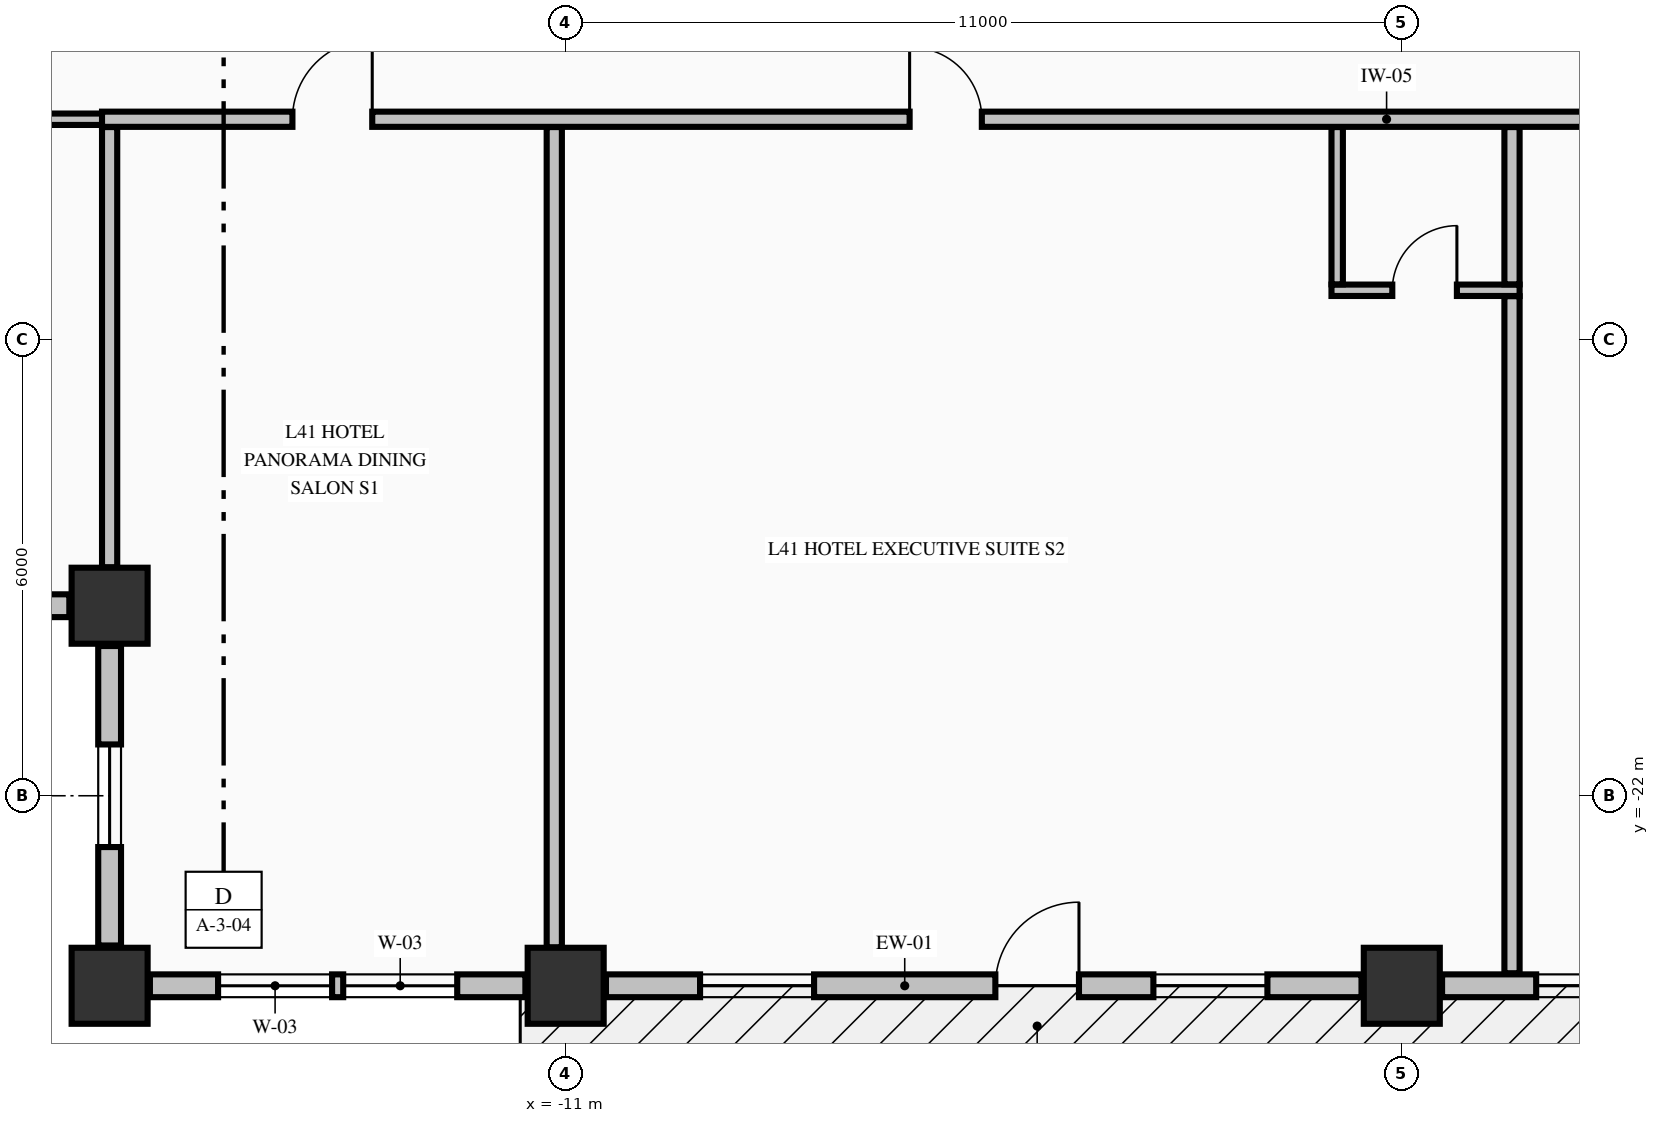
"""IFC4 building model, lengths in metres.
Left out: names, types, materials, properties, quantities, classifications, styles, units other than length and angle.
Written with IfcOpenShell. Run it as: python <this file> out.ifc"""

import sys

from ifc_helpers import new_model, si_unit, direction, frame, frame_2d, origin, origin_2d, place, context, subcontext, project, spatial, rectangle, extrude, element, fill, save


model = new_model("IFC4")
c1 = context("Model", 3, precision=1e-05, world=origin(), true_north=direction((0.0, 1.0)))
c2 = subcontext(c1, "Body", "Model", "MODEL_VIEW")
j1 = project(units=[si_unit("LENGTHUNIT", "METRE"), si_unit("PLANEANGLEUNIT", "RADIAN")], contexts=[c1])
p1 = place(None, origin())
s1 = spatial("IfcSite", under=j1, at=p1, CompositionType="ELEMENT")
p2 = place(p1, origin())
s2 = spatial("IfcBuilding", under=s1, at=p2, CompositionType="ELEMENT")
p3 = place(p2, frame((0.0, 0.0, 162.66)))
s3 = spatial("IfcBuildingStorey", under=s2, at=p3, CompositionType="ELEMENT", Elevation=162.66)
for number, where, z_axis, x_axis in (
    (1, (-17.0, -24.5, -0.25), (0.0, 0.0, 1.0), (1.0, 0.0, 0.0)),
    (2, (-11.0, -24.5, -0.25), (0.0, 0.0, 1.0), (1.0, 0.0, 0.0)),
    (3, (0.0, -24.5, -0.25), (0.0, 0.0, 1.0), (1.0, 0.0, 0.0)),
    (4, (-17.0, -19.5, -0.25), (0.0, 0.0, 1.0), (1.0, 0.0, 0.0)),
):
    element("IfcColumn", number, at=place(p3, frame(where, z_axis=z_axis, x_axis=x_axis)), inside=s3, PredefinedType="COLUMN", context=c2, shape_type="SweptSolid", body=[
        extrude(rectangle(XDim=1.0, YDim=1.0, at=origin_2d()), origin(), (0.0, 0.0, 1.0), 3.4),
    ])
p4 = place(p3, frame((-21.47, -19.5, 0.0), z_axis=(0.0, 0.0, 1.0), x_axis=(1.0, 0.0, 0.0)))
e5 = element("IfcWall", 5, at=p4, inside=s3, PredefinedType="STANDARD", context=c2, shape_type="SweptSolid", body=[
    extrude(rectangle(XDim=3.94, YDim=0.3, at=frame_2d((1.97, 0.0))), origin(), (0.0, 0.0, 1.0), 2.542),
])
p5 = place(p4, frame((1.295, 0.0, 0.68)))
e6 = element("IfcOpeningElement", 6, at=p5, cuts=e5, PredefinedType="OPENING", context=c2, shape_type="SweptSolid", body=[
    extrude(rectangle(XDim=1.35, YDim=1.42, at=frame_2d((0.675, 0.71))), frame((0.0, 0.16, 0.0), z_axis=(0.0, -1.0, 0.0), x_axis=(1.0, 0.0, 0.0)), (0.0, 0.0, 1.0), 0.32),
])
p6 = place(p3, frame((-17.0, -20.03, 0.0), z_axis=(0.0, 0.0, 1.0), x_axis=(0.0, -1.0, 0.0)))
e7 = element("IfcWall", 7, at=p6, inside=s3, PredefinedType="STANDARD", context=c2, shape_type="SweptSolid", body=[
    extrude(rectangle(XDim=3.94, YDim=0.3, at=frame_2d((1.97, 0.0))), origin(), (0.0, 0.0, 1.0), 2.542),
])
p7 = place(p6, frame((1.295, 0.0, 0.68)))
e8 = element("IfcOpeningElement", 8, at=p7, cuts=e7, PredefinedType="OPENING", context=c2, shape_type="SweptSolid", body=[
    extrude(rectangle(XDim=1.35, YDim=1.42, at=frame_2d((0.675, 0.71))), frame((0.0, 0.16, 0.0), z_axis=(0.0, -1.0, 0.0), x_axis=(1.0, 0.0, 0.0)), (0.0, 0.0, 1.0), 0.32),
])
p8 = place(p3, frame((-16.47, -24.5, 0.0), z_axis=(0.0, 0.0, 1.0), x_axis=(1.0, 0.0, 0.0)))
e9 = element("IfcWall", 9, at=p8, inside=s3, PredefinedType="STANDARD", context=c2, shape_type="SweptSolid", body=[
    extrude(rectangle(XDim=4.94, YDim=0.3, at=frame_2d((2.47, 0.0))), origin(), (0.0, 0.0, 1.0), 2.542),
])
p9 = place(p8, frame((0.897, 0.0, 0.72)))
e10 = element("IfcOpeningElement", 10, at=p9, cuts=e9, PredefinedType="OPENING", context=c2, shape_type="SweptSolid", body=[
    extrude(rectangle(XDim=1.5, YDim=1.6, at=frame_2d((0.75, 0.8))), frame((0.0, 0.16, 0.0), z_axis=(0.0, -1.0, 0.0), x_axis=(1.0, 0.0, 0.0)), (0.0, 0.0, 1.0), 0.32),
])
p10 = place(p8, frame((2.543, 0.0, 0.72)))
e11 = element("IfcOpeningElement", 11, at=p10, cuts=e9, PredefinedType="OPENING", context=c2, shape_type="SweptSolid", body=[
    extrude(rectangle(XDim=1.5, YDim=1.6, at=frame_2d((0.75, 0.8))), frame((0.0, 0.16, 0.0), z_axis=(0.0, -1.0, 0.0), x_axis=(1.0, 0.0, 0.0)), (0.0, 0.0, 1.0), 0.32),
])
p11 = place(p3, frame((-10.47, -24.5, 0.0), z_axis=(0.0, 0.0, 1.0), x_axis=(1.0, 0.0, 0.0)))
e12 = element("IfcWall", 12, at=p11, inside=s3, PredefinedType="STANDARD", context=c2, shape_type="SweptSolid", body=[
    extrude(rectangle(XDim=9.94, YDim=0.3, at=frame_2d((4.97, 0.0))), origin(), (0.0, 0.0, 1.0), 2.542),
])
p12 = place(p11, frame((5.123, 0.0, 0.0)))
e13 = element("IfcOpeningElement", 13, at=p12, cuts=e12, PredefinedType="OPENING", context=c2, shape_type="SweptSolid", body=[
    extrude(rectangle(XDim=1.1, YDim=2.15, at=frame_2d((0.55, 1.075))), frame((0.0, 0.16, 0.0), z_axis=(0.0, -1.0, 0.0), x_axis=(1.0, 0.0, 0.0)), (0.0, 0.0, 1.0), 0.32),
])
p13 = place(p11, frame((1.238, 0.0, 0.72)))
e14 = element("IfcOpeningElement", 14, at=p13, cuts=e12, PredefinedType="OPENING", context=c2, shape_type="SweptSolid", body=[
    extrude(rectangle(XDim=1.5, YDim=1.6, at=frame_2d((0.75, 0.8))), frame((0.0, 0.16, 0.0), z_axis=(0.0, -1.0, 0.0), x_axis=(1.0, 0.0, 0.0)), (0.0, 0.0, 1.0), 0.32),
])
p14 = place(p11, frame((7.202, 0.0, 0.72)))
e15 = element("IfcOpeningElement", 15, at=p14, cuts=e12, PredefinedType="OPENING", context=c2, shape_type="SweptSolid", body=[
    extrude(rectangle(XDim=1.5, YDim=1.6, at=frame_2d((0.75, 0.8))), frame((0.0, 0.16, 0.0), z_axis=(0.0, -1.0, 0.0), x_axis=(1.0, 0.0, 0.0)), (0.0, 0.0, 1.0), 0.32),
])
p15 = place(p3, frame((0.53, -24.5, 0.0), z_axis=(0.0, 0.0, 1.0), x_axis=(1.0, 0.0, 0.0)))
e16 = element("IfcWall", 16, at=p15, inside=s3, PredefinedType="STANDARD", context=c2, shape_type="SweptSolid", body=[
    extrude(rectangle(XDim=9.94, YDim=0.3, at=frame_2d((4.97, 0.0))), origin(), (0.0, 0.0, 1.0), 2.542),
])
p16 = place(p15, frame((1.238, 0.0, 0.72)))
e17 = element("IfcOpeningElement", 17, at=p16, cuts=e16, PredefinedType="OPENING", context=c2, shape_type="SweptSolid", body=[
    extrude(rectangle(XDim=1.5, YDim=1.6, at=frame_2d((0.75, 0.8))), frame((0.0, 0.16, 0.0), z_axis=(0.0, -1.0, 0.0), x_axis=(1.0, 0.0, 0.0)), (0.0, 0.0, 1.0), 0.32),
])
p17 = place(p15, frame((3.226, 0.0, 0.72)))
e18 = element("IfcOpeningElement", 18, at=p17, cuts=e16, PredefinedType="OPENING", context=c2, shape_type="SweptSolid", body=[
    extrude(rectangle(XDim=1.5, YDim=1.6, at=frame_2d((0.75, 0.8))), frame((0.0, 0.16, 0.0), z_axis=(0.0, -1.0, 0.0), x_axis=(1.0, 0.0, 0.0)), (0.0, 0.0, 1.0), 0.32),
])
p18 = place(p15, frame((5.214, 0.0, 0.72)))
e19 = element("IfcOpeningElement", 19, at=p18, cuts=e16, PredefinedType="OPENING", context=c2, shape_type="SweptSolid", body=[
    extrude(rectangle(XDim=1.5, YDim=1.6, at=frame_2d((0.75, 0.8))), frame((0.0, 0.16, 0.0), z_axis=(0.0, -1.0, 0.0), x_axis=(1.0, 0.0, 0.0)), (0.0, 0.0, 1.0), 0.32),
])
p19 = place(p15, frame((7.202, 0.0, 0.72)))
e20 = element("IfcOpeningElement", 20, at=p19, cuts=e16, PredefinedType="OPENING", context=c2, shape_type="SweptSolid", body=[
    extrude(rectangle(XDim=1.5, YDim=1.6, at=frame_2d((0.75, 0.8))), frame((0.0, 0.16, 0.0), z_axis=(0.0, -1.0, 0.0), x_axis=(1.0, 0.0, 0.0)), (0.0, 0.0, 1.0), 0.32),
])
p20 = place(p3, frame((-0.925, -15.35, 0.0), z_axis=(0.0, 0.0, 1.0), x_axis=(1.0, 0.0, 0.0)))
e21 = element("IfcWall", 21, at=p20, inside=s3, PredefinedType="PARTITIONING", context=c2, shape_type="SweptSolid", body=[
    extrude(rectangle(XDim=2.475, YDim=0.15, at=frame_2d((1.238, 0.0))), origin(), (0.0, 0.0, 1.0), 3.15),
])
p21 = place(p20, frame((0.8, 0.0, 0.0)))
e22 = element("IfcOpeningElement", 22, at=p21, cuts=e21, PredefinedType="OPENING", context=c2, shape_type="SweptSolid", body=[
    extrude(rectangle(XDim=0.85, YDim=2.1, at=frame_2d((0.425, 1.05))), frame((0.0, 0.085, 0.0), z_axis=(0.0, -1.0, 0.0), x_axis=(1.0, 0.0, 0.0)), (0.0, 0.0, 1.0), 0.17),
])
p22 = place(p3, frame((-20.075, -13.1, 0.0), z_axis=(0.0, 0.0, 1.0), x_axis=(1.0, 0.0, 0.0)))
e23 = element("IfcWall", 23, at=p22, inside=s3, PredefinedType="PARTITIONING", context=c2, shape_type="SweptSolid", body=[
    extrude(rectangle(XDim=3.175, YDim=0.15, at=frame_2d((1.587, 0.0))), origin(), (0.0, 0.0, 1.0), 3.15),
])
p23 = place(p3, frame((-17.1, -13.1, 0.0), z_axis=(0.0, 0.0, 1.0), x_axis=(1.0, 0.0, 0.0)))
e24 = element("IfcWall", 24, at=p23, inside=s3, PredefinedType="PARTITIONING", context=c2, shape_type="SweptSolid", body=[
    extrude(rectangle(XDim=39.2, YDim=0.2, at=frame_2d((19.6, 0.0))), origin(), (0.0, 0.0, 1.0), 3.15),
])
p24 = place(p23, frame((2.505, 0.0, 0.0)))
e25 = element("IfcOpeningElement", 25, at=p24, cuts=e24, PredefinedType="OPENING", context=c2, shape_type="SweptSolid", body=[
    extrude(rectangle(XDim=1.05, YDim=2.15, at=frame_2d((0.525, 1.075))), frame((0.0, 0.11, 0.0), z_axis=(0.0, -1.0, 0.0), x_axis=(1.0, 0.0, 0.0)), (0.0, 0.0, 1.0), 0.22),
])
p25 = place(p23, frame((10.625, 0.0, 0.0)))
e26 = element("IfcOpeningElement", 26, at=p25, cuts=e24, PredefinedType="OPENING", context=c2, shape_type="SweptSolid", body=[
    extrude(rectangle(XDim=0.95, YDim=2.15, at=frame_2d((0.475, 1.075))), frame((0.0, 0.11, 0.0), z_axis=(0.0, -1.0, 0.0), x_axis=(1.0, 0.0, 0.0)), (0.0, 0.0, 1.0), 0.22),
])
p26 = place(p23, frame((22.225, 0.0, 0.0)))
e27 = element("IfcOpeningElement", 27, at=p26, cuts=e24, PredefinedType="OPENING", context=c2, shape_type="SweptSolid", body=[
    extrude(rectangle(XDim=0.95, YDim=2.15, at=frame_2d((0.475, 1.075))), frame((0.0, 0.11, 0.0), z_axis=(0.0, -1.0, 0.0), x_axis=(1.0, 0.0, 0.0)), (0.0, 0.0, 1.0), 0.22),
])
p27 = place(p23, frame((32.505, 0.0, 0.0)))
e28 = element("IfcOpeningElement", 28, at=p27, cuts=e24, PredefinedType="OPENING", context=c2, shape_type="SweptSolid", body=[
    extrude(rectangle(XDim=0.95, YDim=2.15, at=frame_2d((0.475, 1.075))), frame((0.0, 0.11, 0.0), z_axis=(0.0, -1.0, 0.0), x_axis=(1.0, 0.0, 0.0)), (0.0, 0.0, 1.0), 0.22),
])
p28 = place(p3, frame((-17.0, -18.994, 0.0), z_axis=(0.0, 0.0, 1.0), x_axis=(0.0, 1.0, 0.0)))
e29 = element("IfcWall", 29, at=p28, inside=s3, PredefinedType="PARTITIONING", context=c2, shape_type="SweptSolid", body=[
    extrude(rectangle(XDim=5.791, YDim=0.2, at=frame_2d((2.896, 0.0))), origin(), (0.0, 0.0, 1.0), 3.15),
])
p29 = place(p3, frame((-11.15, -23.994, 0.0), z_axis=(0.0, 0.0, 1.0), x_axis=(0.0, 1.0, 0.0)))
e30 = element("IfcWall", 30, at=p29, inside=s3, PredefinedType="PARTITIONING", context=c2, shape_type="SweptSolid", body=[
    extrude(rectangle(XDim=10.791, YDim=0.2, at=frame_2d((5.396, 0.0))), origin(), (0.0, 0.0, 1.0), 2.342),
])
p30 = place(p3, frame((-0.85, -15.272, 0.0), z_axis=(0.0, 0.0, 1.0), x_axis=(0.0, 1.0, 0.0)))
e31 = element("IfcWall", 31, at=p30, inside=s3, PredefinedType="PARTITIONING", context=c2, shape_type="SweptSolid", body=[
    extrude(rectangle(XDim=2.069, YDim=0.15, at=frame_2d((1.035, 0.0))), origin(), (0.0, 0.0, 1.0), 3.15),
])
p31 = place(p3, frame((1.45, -24.335, 0.0), z_axis=(0.0, 0.0, 1.0), x_axis=(0.0, 1.0, 0.0)))
e32 = element("IfcWall", 32, at=p31, inside=s3, PredefinedType="PARTITIONING", context=c2, shape_type="SweptSolid", body=[
    extrude(rectangle(XDim=8.907, YDim=0.2, at=frame_2d((4.454, 0.0))), origin(), (0.0, 0.0, 1.0), 3.15),
])
p32 = place(p3, frame((1.45, -15.272, 0.0), z_axis=(0.0, 0.0, 1.0), x_axis=(0.0, 1.0, 0.0)))
e33 = element("IfcWall", 33, at=p32, inside=s3, PredefinedType="PARTITIONING", context=c2, shape_type="SweptSolid", body=[
    extrude(rectangle(XDim=2.069, YDim=0.2, at=frame_2d((1.035, 0.0))), origin(), (0.0, 0.0, 1.0), 3.15),
])
p33 = place(p7, origin())
e34 = element("IfcWindow", 34, at=p33, inside=s3, PartitioningType="SINGLE_PANEL", PredefinedType="WINDOW", context=c2, shape_type="SweptSolid", body=[
    extrude(rectangle(XDim=1.35, YDim=1.42, at=frame_2d((0.675, 0.71))), frame((0.0, 0.03, 0.0), z_axis=(0.0, -1.0, 0.0), x_axis=(1.0, 0.0, 0.0)), (0.0, 0.0, 1.0), 0.06),
])
fill(e8, e34)
p34 = place(p9, origin())
e35 = element("IfcWindow", 35, at=p34, inside=s3, PartitioningType="SINGLE_PANEL", PredefinedType="WINDOW", context=c2, shape_type="SweptSolid", body=[
    extrude(rectangle(XDim=1.5, YDim=1.6, at=frame_2d((0.75, 0.8))), frame((0.0, 0.03, 0.0), z_axis=(0.0, -1.0, 0.0), x_axis=(1.0, 0.0, 0.0)), (0.0, 0.0, 1.0), 0.06),
])
fill(e10, e35)
p35 = place(p10, origin())
e36 = element("IfcWindow", 36, at=p35, inside=s3, PartitioningType="SINGLE_PANEL", PredefinedType="WINDOW", context=c2, shape_type="SweptSolid", body=[
    extrude(rectangle(XDim=1.5, YDim=1.6, at=frame_2d((0.75, 0.8))), frame((0.0, 0.03, 0.0), z_axis=(0.0, -1.0, 0.0), x_axis=(1.0, 0.0, 0.0)), (0.0, 0.0, 1.0), 0.06),
])
fill(e11, e36)
p36 = place(p12, origin())
e37 = element("IfcDoor", 37, at=p36, inside=s3, OperationType="SINGLE_SWING_RIGHT", PredefinedType="DOOR", context=c2, shape_type="SweptSolid", body=[
    extrude(rectangle(XDim=1.1, YDim=2.15, at=frame_2d((0.55, 1.075))), frame((0.0, 0.025, 0.0), z_axis=(0.0, -1.0, 0.0), x_axis=(1.0, 0.0, 0.0)), (0.0, 0.0, 1.0), 0.05),
])
fill(e13, e37)
p37 = place(p13, origin())
e38 = element("IfcWindow", 38, at=p37, inside=s3, PartitioningType="SINGLE_PANEL", PredefinedType="WINDOW", context=c2, shape_type="SweptSolid", body=[
    extrude(rectangle(XDim=1.5, YDim=1.6, at=frame_2d((0.75, 0.8))), frame((0.0, 0.03, 0.0), z_axis=(0.0, -1.0, 0.0), x_axis=(1.0, 0.0, 0.0)), (0.0, 0.0, 1.0), 0.06),
])
fill(e14, e38)
p38 = place(p14, origin())
e39 = element("IfcWindow", 39, at=p38, inside=s3, PartitioningType="SINGLE_PANEL", PredefinedType="WINDOW", context=c2, shape_type="SweptSolid", body=[
    extrude(rectangle(XDim=1.5, YDim=1.6, at=frame_2d((0.75, 0.8))), frame((0.0, 0.03, 0.0), z_axis=(0.0, -1.0, 0.0), x_axis=(1.0, 0.0, 0.0)), (0.0, 0.0, 1.0), 0.06),
])
fill(e15, e39)
p39 = place(p16, origin())
e40 = element("IfcWindow", 40, at=p39, inside=s3, PartitioningType="SINGLE_PANEL", PredefinedType="WINDOW", context=c2, shape_type="SweptSolid", body=[
    extrude(rectangle(XDim=1.5, YDim=1.6, at=frame_2d((0.75, 0.8))), frame((0.0, 0.03, 0.0), z_axis=(0.0, -1.0, 0.0), x_axis=(1.0, 0.0, 0.0)), (0.0, 0.0, 1.0), 0.06),
])
fill(e17, e40)
p40 = place(p24, origin())
e41 = element("IfcDoor", 41, at=p40, inside=s3, OperationType="SINGLE_SWING_RIGHT", PredefinedType="DOOR", context=c2, shape_type="SweptSolid", body=[
    extrude(rectangle(XDim=1.05, YDim=2.15, at=frame_2d((0.525, 1.075))), frame((0.0, 0.025, 0.0), z_axis=(0.0, -1.0, 0.0), x_axis=(1.0, 0.0, 0.0)), (0.0, 0.0, 1.0), 0.05),
])
fill(e25, e41)
p41 = place(p25, origin())
e42 = element("IfcDoor", 42, at=p41, inside=s3, OperationType="SINGLE_SWING_LEFT", PredefinedType="DOOR", context=c2, shape_type="SweptSolid", body=[
    extrude(rectangle(XDim=0.95, YDim=2.15, at=frame_2d((0.475, 1.075))), frame((0.0, 0.025, 0.0), z_axis=(0.0, -1.0, 0.0), x_axis=(1.0, 0.0, 0.0)), (0.0, 0.0, 1.0), 0.05),
])
fill(e26, e42)
p42 = place(p21, origin())
e43 = element("IfcDoor", 43, at=p42, inside=s3, OperationType="SINGLE_SWING_RIGHT", PredefinedType="DOOR", context=c2, shape_type="SweptSolid", body=[
    extrude(rectangle(XDim=0.85, YDim=2.1, at=frame_2d((0.425, 1.05))), frame((0.0, 0.025, 0.0), z_axis=(0.0, -1.0, 0.0), x_axis=(1.0, 0.0, 0.0)), (0.0, 0.0, 1.0), 0.05),
])
fill(e22, e43)
save(model, sys.argv[1])
